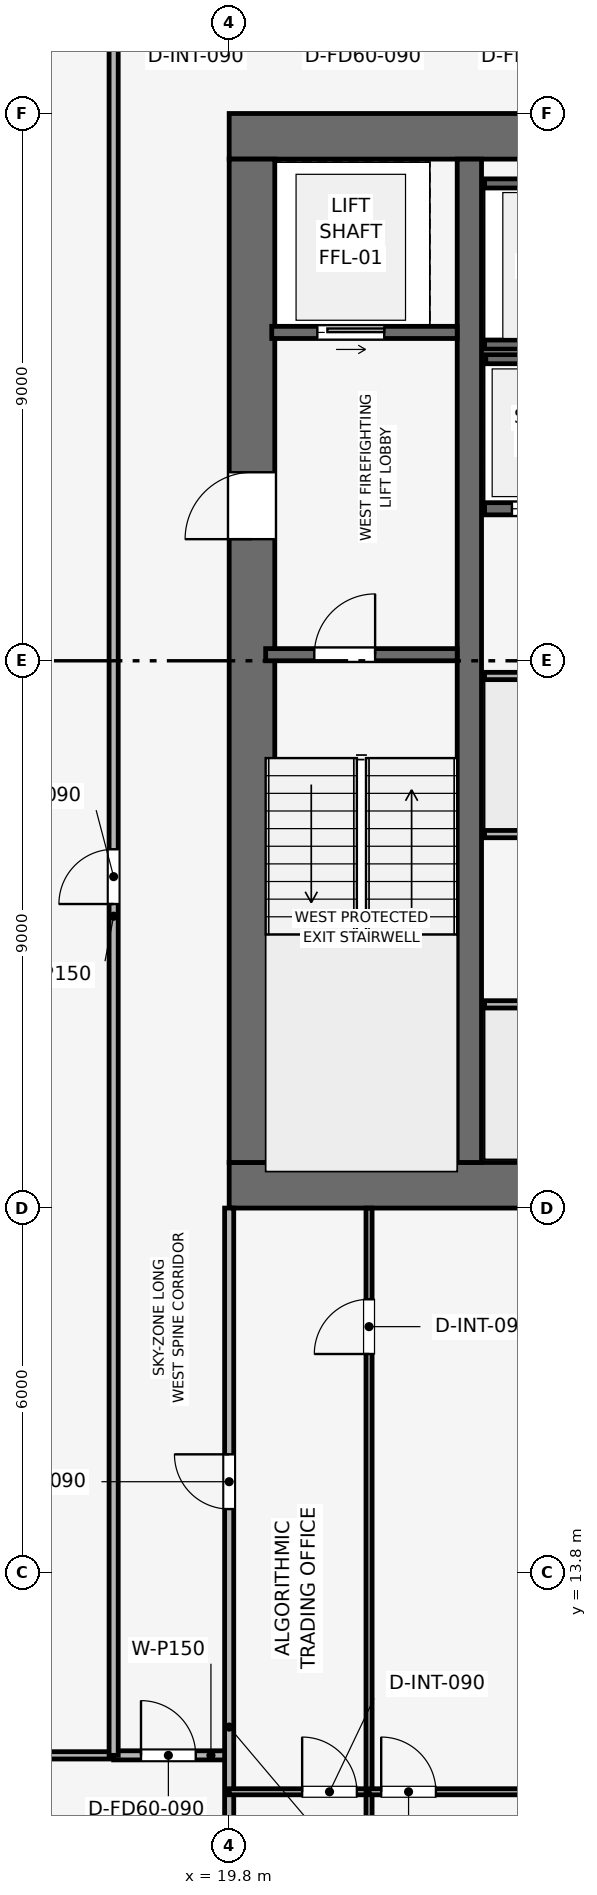
"""IFC4 building model, lengths in metres.
Left out: names, types, materials, properties, quantities, classifications, styles, units other than length and angle.
Written with IfcOpenShell. Run it as: python <this file> out.ifc"""

import sys

from ifc_helpers import new_model, si_unit, direction, frame, frame_2d, origin, place, context, subcontext, project, spatial, rectangle, extrude, element, fill, save


model = new_model("IFC4")
c1 = context("Model", 3, precision=1e-05, world=origin(), true_north=direction((0.0, 1.0)))
c2 = subcontext(c1, "Body", "Model", "MODEL_VIEW")
j1 = project(units=[si_unit("LENGTHUNIT", "METRE"), si_unit("PLANEANGLEUNIT", "RADIAN")], contexts=[c1])
p1 = place(None, origin())
s1 = spatial("IfcSite", under=j1, at=p1, CompositionType="ELEMENT")
p2 = place(p1, origin())
s2 = spatial("IfcBuilding", under=s1, at=p2, CompositionType="ELEMENT")
p3 = place(p2, frame((0.0, 0.0, 250.35)))
s3 = spatial("IfcBuildingStorey", under=s2, at=p3, CompositionType="ELEMENT", Elevation=250.35)
p4 = place(p3, frame((19.8, 20.175, 0.0), z_axis=(0.0, 0.0, 1.0), x_axis=(1.0, 0.0, 0.0)))
e1 = element("IfcWall", 1, at=p4, inside=s3, PredefinedType="SHEAR", context=c2, shape_type="SweptSolid", body=[
    extrude(rectangle(XDim=18.0, YDim=0.75, at=frame_2d((9.0, 0.0))), origin(), (0.0, 0.0, 1.0), 3.75),
])
p5 = place(p3, frame((19.8, 37.425, 0.0), z_axis=(0.0, 0.0, 1.0), x_axis=(1.0, 0.0, 0.0)))
e2 = element("IfcWall", 2, at=p5, inside=s3, PredefinedType="SHEAR", context=c2, shape_type="SweptSolid", body=[
    extrude(rectangle(XDim=18.0, YDim=0.75, at=frame_2d((9.0, 0.0))), origin(), (0.0, 0.0, 1.0), 3.75),
])
p6 = place(p5, frame((7.05, 0.0, 0.0)))
e3 = element("IfcOpeningElement", 3, at=p6, cuts=e2, PredefinedType="OPENING", context=c2, shape_type="SweptSolid", body=[
    extrude(rectangle(XDim=1.1, YDim=2.15, at=frame_2d((0.55, 1.075))), frame((0.0, 0.385, 0.0), z_axis=(0.0, -1.0, 0.0), x_axis=(1.0, 0.0, 0.0)), (0.0, 0.0, 1.0), 0.77),
])
p7 = place(p3, frame((20.175, 20.55, 0.0), z_axis=(0.0, 0.0, 1.0), x_axis=(0.0, 1.0, 0.0)))
e4 = element("IfcWall", 4, at=p7, inside=s3, PredefinedType="SHEAR", context=c2, shape_type="SweptSolid", body=[
    extrude(rectangle(XDim=16.5, YDim=0.75, at=frame_2d((8.25, 0.0))), origin(), (0.0, 0.0, 1.0), 3.75),
])
p8 = place(p7, frame((10.25, 0.0, 0.0)))
e5 = element("IfcOpeningElement", 5, at=p8, cuts=e4, PredefinedType="OPENING", context=c2, shape_type="SweptSolid", body=[
    extrude(rectangle(XDim=1.1, YDim=2.15, at=frame_2d((0.55, 1.075))), frame((0.0, 0.385, 0.0), z_axis=(0.0, -1.0, 0.0), x_axis=(1.0, 0.0, 0.0)), (0.0, 0.0, 1.0), 0.77),
])
p9 = place(p3, frame((23.75, 20.55, 0.0), z_axis=(0.0, 0.0, 1.0), x_axis=(0.0, 1.0, 0.0)))
e6 = element("IfcWall", 6, at=p9, inside=s3, PredefinedType="SHEAR", context=c2, shape_type="SweptSolid", body=[
    extrude(rectangle(XDim=16.5, YDim=0.4, at=frame_2d((8.25, 0.0))), origin(), (0.0, 0.0, 1.0), 3.75),
])
p10 = place(p3, frame((20.4, 28.9, 0.0), z_axis=(0.0, 0.0, 1.0), x_axis=(1.0, 0.0, 0.0)))
e7 = element("IfcWall", 7, at=p10, inside=s3, PredefinedType="SHEAR", context=c2, shape_type="SweptSolid", body=[
    extrude(rectangle(XDim=3.15, YDim=0.2, at=frame_2d((1.575, 0.0))), origin(), (0.0, 0.0, 1.0), 3.5),
])
p11 = place(p10, frame((0.8, 0.0, 0.0)))
e8 = element("IfcOpeningElement", 8, at=p11, cuts=e7, PredefinedType="OPENING", context=c2, shape_type="SweptSolid", body=[
    extrude(rectangle(XDim=1.0, YDim=2.1, at=frame_2d((0.5, 1.05))), frame((0.0, 0.11, 0.0), z_axis=(0.0, -1.0, 0.0), x_axis=(1.0, 0.0, 0.0)), (0.0, 0.0, 1.0), 0.22),
])
p12 = place(p3, frame((20.5, 34.2, 0.0), z_axis=(0.0, 0.0, 1.0), x_axis=(1.0, 0.0, 0.0)))
e9 = element("IfcWall", 9, at=p12, inside=s3, PredefinedType="SHEAR", context=c2, shape_type="SweptSolid", body=[
    extrude(rectangle(XDim=3.05, YDim=0.2, at=frame_2d((1.525, 0.0))), origin(), (0.0, 0.0, 1.0), 3.5),
])
p13 = place(p12, frame((0.75, 0.0, 0.0)))
e10 = element("IfcOpeningElement", 10, at=p13, cuts=e9, PredefinedType="OPENING", context=c2, shape_type="SweptSolid", body=[
    extrude(rectangle(XDim=1.1, YDim=2.15, at=frame_2d((0.55, 1.075))), frame((0.0, 0.11, 0.0), z_axis=(0.0, -1.0, 0.0), x_axis=(1.0, 0.0, 0.0)), (0.0, 0.0, 1.0), 0.22),
])
for number, where, z_axis, x_axis in (
    (11, (24.0, 34.0, 0.0), (0.0, 0.0, 1.0), (1.0, 0.0, 0.0)),
    (12, (24.0, 36.65, 0.0), (0.0, 0.0, 1.0), (1.0, 0.0, 0.0)),
):
    element("IfcWall", number, at=place(p3, frame(where, z_axis=z_axis, x_axis=x_axis)), inside=s3, PredefinedType="SHEAR", context=c2, shape_type="SweptSolid", body=[
        extrude(rectangle(XDim=2.48, YDim=0.15, at=frame_2d((1.24, 0.0))), origin(), (0.0, 0.0, 1.0), 3.5),
    ])
p14 = place(p3, frame((24.0, 31.3, 0.0), z_axis=(0.0, 0.0, 1.0), x_axis=(1.0, 0.0, 0.0)))
e13 = element("IfcWall", 13, at=p14, inside=s3, PredefinedType="SHEAR", context=c2, shape_type="SweptSolid", body=[
    extrude(rectangle(XDim=2.0, YDim=0.2, at=frame_2d((1.0, 0.0))), origin(), (0.0, 0.0, 1.0), 3.5),
])
p15 = place(p14, frame((0.45, 0.0, 0.0)))
e14 = element("IfcOpeningElement", 14, at=p15, cuts=e13, PredefinedType="OPENING", context=c2, shape_type="SweptSolid", body=[
    extrude(rectangle(XDim=1.1, YDim=2.15, at=frame_2d((0.55, 1.075))), frame((0.0, 0.11, 0.0), z_axis=(0.0, -1.0, 0.0), x_axis=(1.0, 0.0, 0.0)), (0.0, 0.0, 1.0), 0.22),
])
p16 = place(p3, frame((24.02, 33.76, 0.0), z_axis=(0.0, 0.0, 1.0), x_axis=(1.0, 0.0, 0.0)))
e15 = element("IfcWall", 15, at=p16, inside=s3, PredefinedType="SHEAR", context=c2, shape_type="SweptSolid", body=[
    extrude(rectangle(XDim=4.08, YDim=0.15, at=frame_2d((2.04, 0.0))), origin(), (0.0, 0.0, 1.0), 3.5),
])
p17 = place(p3, frame((24.0, 23.15, 0.0), z_axis=(0.0, 0.0, 1.0), x_axis=(1.0, 0.0, 0.0)))
e16 = element("IfcWall", 16, at=p17, inside=s3, PredefinedType="PARTITIONING", context=c2, shape_type="SweptSolid", body=[
    extrude(rectangle(XDim=4.05, YDim=0.12, at=frame_2d((2.025, 0.0))), origin(), (0.0, 0.0, 1.0), 3.5),
])
p18 = place(p17, frame((1.575, 0.0, 0.0)))
e17 = element("IfcOpeningElement", 17, at=p18, cuts=e16, PredefinedType="OPENING", context=c2, shape_type="SweptSolid", body=[
    extrude(rectangle(XDim=0.9, YDim=2.1, at=frame_2d((0.45, 1.05))), frame((0.0, 0.07, 0.0), z_axis=(0.0, -1.0, 0.0), x_axis=(1.0, 0.0, 0.0)), (0.0, 0.0, 1.0), 0.14),
])
p19 = place(p3, frame((24.0, 25.95, 0.0), z_axis=(0.0, 0.0, 1.0), x_axis=(1.0, 0.0, 0.0)))
e18 = element("IfcWall", 18, at=p19, inside=s3, PredefinedType="PARTITIONING", context=c2, shape_type="SweptSolid", body=[
    extrude(rectangle(XDim=4.05, YDim=0.12, at=frame_2d((2.025, 0.0))), origin(), (0.0, 0.0, 1.0), 3.5),
])
p20 = place(p19, frame((1.575, 0.0, 0.0)))
e19 = element("IfcOpeningElement", 19, at=p20, cuts=e18, PredefinedType="OPENING", context=c2, shape_type="SweptSolid", body=[
    extrude(rectangle(XDim=0.9, YDim=2.1, at=frame_2d((0.45, 1.05))), frame((0.0, 0.07, 0.0), z_axis=(0.0, -1.0, 0.0), x_axis=(1.0, 0.0, 0.0)), (0.0, 0.0, 1.0), 0.14),
])
p21 = place(p3, frame((24.0, 28.55, 0.0), z_axis=(0.0, 0.0, 1.0), x_axis=(1.0, 0.0, 0.0)))
e20 = element("IfcWall", 20, at=p21, inside=s3, PredefinedType="PARTITIONING", context=c2, shape_type="SweptSolid", body=[
    extrude(rectangle(XDim=4.05, YDim=0.12, at=frame_2d((2.025, 0.0))), origin(), (0.0, 0.0, 1.0), 3.5),
])
p22 = place(p3, frame((10.8, 10.8, 0.0), z_axis=(0.0, 0.0, 1.0), x_axis=(1.0, 0.0, 0.0)))
e21 = element("IfcWall", 21, at=p22, inside=s3, PredefinedType="PARTITIONING", context=c2, shape_type="SweptSolid", body=[
    extrude(rectangle(XDim=7.1, YDim=0.12, at=frame_2d((3.55, 0.0))), origin(), (0.0, 0.0, 1.0), 3.085),
])
p23 = place(p3, frame((17.9, 10.8, 0.0), z_axis=(0.0, 0.0, 1.0), x_axis=(1.0, 0.0, 0.0)))
e22 = element("IfcWall", 22, at=p23, inside=s3, PredefinedType="PARTITIONING", context=c2, shape_type="SweptSolid", body=[
    extrude(rectangle(XDim=1.9, YDim=0.15, at=frame_2d((0.95, 0.0))), origin(), (0.0, 0.0, 1.0), 3.5),
])
p24 = place(p23, frame((0.45, 0.0, 0.0)))
e23 = element("IfcOpeningElement", 23, at=p24, cuts=e22, PredefinedType="OPENING", context=c2, shape_type="SweptSolid", body=[
    extrude(rectangle(XDim=0.9, YDim=2.1, at=frame_2d((0.45, 1.05))), frame((0.0, 0.085, 0.0), z_axis=(0.0, -1.0, 0.0), x_axis=(1.0, 0.0, 0.0)), (0.0, 0.0, 1.0), 0.17),
])
p25 = place(p3, frame((19.8, 4.03, 0.0), z_axis=(0.0, 0.0, 1.0), x_axis=(0.0, 1.0, 0.0)))
e24 = element("IfcWall", 24, at=p25, inside=s3, PredefinedType="PARTITIONING", context=c2, shape_type="SweptSolid", body=[
    extrude(rectangle(XDim=15.77, YDim=0.15, at=frame_2d((7.885, 0.0))), origin(), (0.0, 0.0, 1.0), 3.085),
])
p26 = place(p25, frame((10.82, 0.0, 0.0)))
e25 = element("IfcOpeningElement", 25, at=p26, cuts=e24, PredefinedType="OPENING", context=c2, shape_type="SweptSolid", body=[
    extrude(rectangle(XDim=0.9, YDim=2.1, at=frame_2d((0.45, 1.05))), frame((0.0, 0.085, 0.0), z_axis=(0.0, -1.0, 0.0), x_axis=(1.0, 0.0, 0.0)), (0.0, 0.0, 1.0), 0.17),
])
p27 = place(p3, frame((19.8, 10.201, 0.0), z_axis=(0.0, 0.0, 1.0), x_axis=(1.0, 0.0, 0.0)))
e26 = element("IfcWall", 26, at=p27, inside=s3, PredefinedType="MOVABLE", context=c2, shape_type="SweptSolid", body=[
    extrude(rectangle(XDim=2.3, YDim=0.1, at=frame_2d((1.15, 0.0))), origin(), (0.0, 0.0, 1.0), 3.085),
])
p28 = place(p27, frame((1.2, 0.0, 0.0)))
e27 = element("IfcOpeningElement", 27, at=p28, cuts=e26, PredefinedType="OPENING", context=c2, shape_type="SweptSolid", body=[
    extrude(rectangle(XDim=0.9, YDim=2.1, at=frame_2d((0.45, 1.05))), frame((0.0, 0.06, 0.0), z_axis=(0.0, -1.0, 0.0), x_axis=(1.0, 0.0, 0.0)), (0.0, 0.0, 1.0), 0.12),
])
p29 = place(p3, frame((22.1, 4.03, 0.0), z_axis=(0.0, 0.0, 1.0), x_axis=(0.0, 1.0, 0.0)))
e28 = element("IfcWall", 28, at=p29, inside=s3, PredefinedType="MOVABLE", context=c2, shape_type="SweptSolid", body=[
    extrude(rectangle(XDim=15.77, YDim=0.1, at=frame_2d((7.885, 0.0))), origin(), (0.0, 0.0, 1.0), 3.085),
])
p30 = place(p29, frame((13.37, 0.0, 0.0)))
e29 = element("IfcOpeningElement", 29, at=p30, cuts=e28, PredefinedType="OPENING", context=c2, shape_type="SweptSolid", body=[
    extrude(rectangle(XDim=0.9, YDim=2.1, at=frame_2d((0.45, 1.05))), frame((0.0, 0.06, 0.0), z_axis=(0.0, -1.0, 0.0), x_axis=(1.0, 0.0, 0.0)), (0.0, 0.0, 1.0), 0.12),
])
p31 = place(p3, frame((22.1, 10.201, 0.0), z_axis=(0.0, 0.0, 1.0), x_axis=(1.0, 0.0, 0.0)))
e30 = element("IfcWall", 30, at=p31, inside=s3, PredefinedType="MOVABLE", context=c2, shape_type="SweptSolid", body=[
    extrude(rectangle(XDim=10.992, YDim=0.1, at=frame_2d((5.496, 0.0))), origin(), (0.0, 0.0, 1.0), 3.085),
])
p32 = place(p31, frame((0.2, 0.0, 0.0)))
e31 = element("IfcOpeningElement", 31, at=p32, cuts=e30, PredefinedType="OPENING", context=c2, shape_type="SweptSolid", body=[
    extrude(rectangle(XDim=0.9, YDim=2.1, at=frame_2d((0.45, 1.05))), frame((0.0, 0.06, 0.0), z_axis=(0.0, -1.0, 0.0), x_axis=(1.0, 0.0, 0.0)), (0.0, 0.0, 1.0), 0.12),
])
p33 = place(p3, frame((17.9, 10.8, 0.0), z_axis=(0.0, 0.0, 1.0), x_axis=(0.0, 1.0, 0.0)))
e32 = element("IfcWall", 32, at=p33, inside=s3, PredefinedType="PARTITIONING", context=c2, shape_type="SweptSolid", body=[
    extrude(rectangle(XDim=28.9, YDim=0.15, at=frame_2d((14.45, 0.0))), origin(), (0.0, 0.0, 1.0), 3.085),
])
p34 = place(p33, frame((14.0, 0.0, 0.0)))
e33 = element("IfcOpeningElement", 33, at=p34, cuts=e32, PredefinedType="OPENING", context=c2, shape_type="SweptSolid", body=[
    extrude(rectangle(XDim=0.9, YDim=2.1, at=frame_2d((0.45, 1.05))), frame((0.0, 0.085, 0.0), z_axis=(0.0, -1.0, 0.0), x_axis=(1.0, 0.0, 0.0)), (0.0, 0.0, 1.0), 0.17),
])
p35 = place(p11, origin())
e34 = element("IfcDoor", 34, at=p35, inside=s3, OperationType="SINGLE_SWING_RIGHT", PredefinedType="DOOR", context=c2, shape_type="SweptSolid", body=[
    extrude(rectangle(XDim=1.0, YDim=2.1, at=frame_2d((0.5, 1.05))), frame((0.0, 0.025, 0.0), z_axis=(0.0, -1.0, 0.0), x_axis=(1.0, 0.0, 0.0)), (0.0, 0.0, 1.0), 0.05),
])
fill(e8, e34)
p36 = place(p13, origin())
e35 = element("IfcDoor", 35, at=p36, inside=s3, OperationType="SLIDING_TO_RIGHT", PredefinedType="DOOR", context=c2, shape_type="SweptSolid", body=[
    extrude(rectangle(XDim=1.1, YDim=2.15, at=frame_2d((0.55, 1.075))), frame((0.0, 0.025, 0.0), z_axis=(0.0, -1.0, 0.0), x_axis=(1.0, 0.0, 0.0)), (0.0, 0.0, 1.0), 0.05),
])
fill(e10, e35)
p37 = place(p15, origin())
e36 = element("IfcDoor", 36, at=p37, inside=s3, OperationType="SLIDING_TO_RIGHT", PredefinedType="DOOR", context=c2, shape_type="SweptSolid", body=[
    extrude(rectangle(XDim=1.1, YDim=2.15, at=frame_2d((0.55, 1.075))), frame((0.0, 0.025, 0.0), z_axis=(0.0, -1.0, 0.0), x_axis=(1.0, 0.0, 0.0)), (0.0, 0.0, 1.0), 0.05),
])
fill(e14, e36)
p38 = place(p24, origin())
e37 = element("IfcDoor", 37, at=p38, inside=s3, OperationType="SINGLE_SWING_LEFT", PredefinedType="DOOR", context=c2, shape_type="SweptSolid", body=[
    extrude(rectangle(XDim=0.9, YDim=2.1, at=frame_2d((0.45, 1.05))), frame((0.0, 0.025, 0.0), z_axis=(0.0, -1.0, 0.0), x_axis=(1.0, 0.0, 0.0)), (0.0, 0.0, 1.0), 0.05),
])
fill(e23, e37)
p39 = place(p26, origin())
e38 = element("IfcDoor", 38, at=p39, inside=s3, OperationType="SINGLE_SWING_RIGHT", PredefinedType="DOOR", context=c2, shape_type="SweptSolid", body=[
    extrude(rectangle(XDim=0.9, YDim=2.1, at=frame_2d((0.45, 1.05))), frame((0.0, 0.025, 0.0), z_axis=(0.0, -1.0, 0.0), x_axis=(1.0, 0.0, 0.0)), (0.0, 0.0, 1.0), 0.05),
])
fill(e25, e38)
p40 = place(p28, origin())
e39 = element("IfcDoor", 39, at=p40, inside=s3, OperationType="SINGLE_SWING_LEFT", PredefinedType="DOOR", context=c2, shape_type="SweptSolid", body=[
    extrude(rectangle(XDim=0.9, YDim=2.1, at=frame_2d((0.45, 1.05))), frame((0.0, 0.025, 0.0), z_axis=(0.0, -1.0, 0.0), x_axis=(1.0, 0.0, 0.0)), (0.0, 0.0, 1.0), 0.05),
])
fill(e27, e39)
p41 = place(p30, origin())
e40 = element("IfcDoor", 40, at=p41, inside=s3, OperationType="SINGLE_SWING_LEFT", PredefinedType="DOOR", context=c2, shape_type="SweptSolid", body=[
    extrude(rectangle(XDim=0.9, YDim=2.1, at=frame_2d((0.45, 1.05))), frame((0.0, 0.025, 0.0), z_axis=(0.0, -1.0, 0.0), x_axis=(1.0, 0.0, 0.0)), (0.0, 0.0, 1.0), 0.05),
])
fill(e29, e40)
p42 = place(p32, origin())
e41 = element("IfcDoor", 41, at=p42, inside=s3, OperationType="SINGLE_SWING_LEFT", PredefinedType="DOOR", context=c2, shape_type="SweptSolid", body=[
    extrude(rectangle(XDim=0.9, YDim=2.1, at=frame_2d((0.45, 1.05))), frame((0.0, 0.025, 0.0), z_axis=(0.0, -1.0, 0.0), x_axis=(1.0, 0.0, 0.0)), (0.0, 0.0, 1.0), 0.05),
])
fill(e31, e41)
p43 = place(p34, origin())
e42 = element("IfcDoor", 42, at=p43, inside=s3, OperationType="SINGLE_SWING_LEFT", PredefinedType="DOOR", context=c2, shape_type="SweptSolid", body=[
    extrude(rectangle(XDim=0.9, YDim=2.1, at=frame_2d((0.45, 1.05))), frame((0.0, 0.025, 0.0), z_axis=(0.0, -1.0, 0.0), x_axis=(1.0, 0.0, 0.0)), (0.0, 0.0, 1.0), 0.05),
])
fill(e33, e42)
p44 = place(p8, origin())
e43 = element("IfcDoor", 43, at=p44, inside=s3, OperationType="SINGLE_SWING_LEFT", PredefinedType="DOOR", context=c2, shape_type="SweptSolid", body=[
    extrude(rectangle(XDim=1.1, YDim=2.15, at=frame_2d((0.55, 1.075))), frame((0.0, 0.025, 0.0), z_axis=(0.0, -1.0, 0.0), x_axis=(1.0, 0.0, 0.0)), (0.0, 0.0, 1.0), 0.05),
])
fill(e5, e43)
save(model, sys.argv[1])
